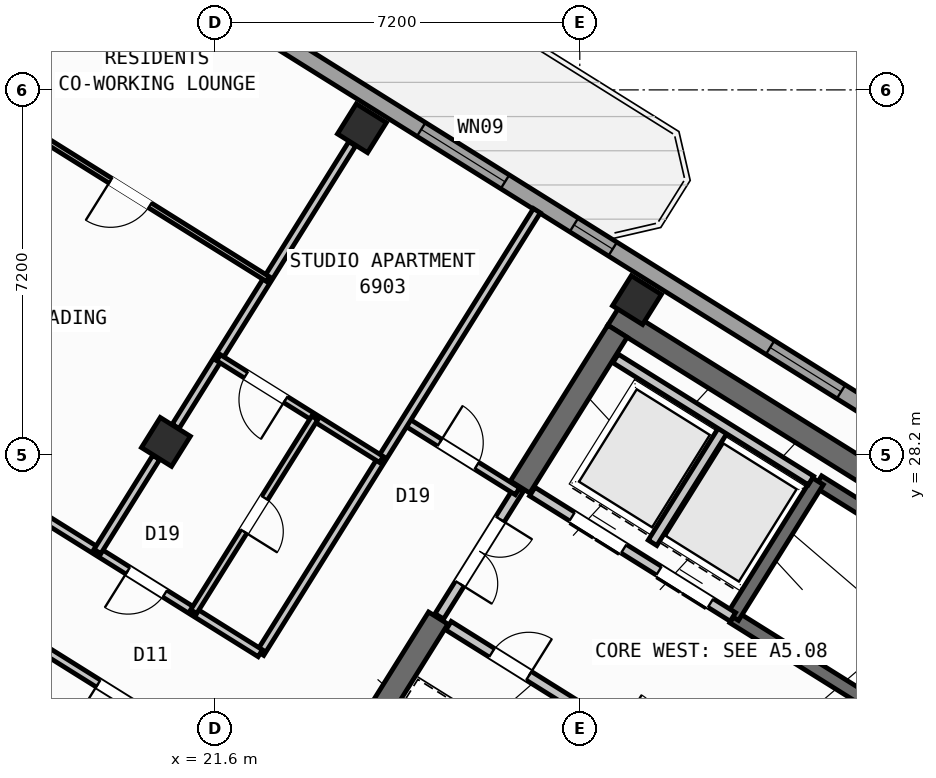
"""IFC4 building model, lengths in metres.
Left out: names, types, materials, properties, quantities, classifications, styles, units other than length and angle.
Written with IfcOpenShell. Run it as: python <this file> out.ifc"""

import sys

from ifc_helpers import new_model, si_unit, direction, frame, frame_2d, origin, origin_2d, place, context, subcontext, project, spatial, rectangle, hollow_rectangle, extrude, source, transform, mapped, element, fill, save


model = new_model("IFC4")
c1 = context("Model", 3, precision=1e-05, world=origin(), true_north=direction((0.0, 1.0)))
c2 = subcontext(c1, "Body", "Model", "MODEL_VIEW")
j1 = project(units=[si_unit("LENGTHUNIT", "METRE"), si_unit("PLANEANGLEUNIT", "RADIAN")], contexts=[c1])
p1 = place(None, origin())
s1 = spatial("IfcSite", under=j1, at=p1, CompositionType="ELEMENT")
p2 = place(p1, origin())
s2 = spatial("IfcBuilding", under=s1, at=p2, CompositionType="ELEMENT")
p3 = place(p2, frame((0.0, 0.0, 273.6)))
s3 = spatial("IfcBuildingStorey", under=s2, at=p3, CompositionType="ELEMENT", Elevation=273.6)
p4 = place(p3, frame((40.531, 24.036, 0.0), z_axis=(0.0, 0.0, 1.0), x_axis=(-0.848048787466, 0.529918157905, 0.0)))
e1 = element("IfcWall", 1, at=p4, inside=s3, PredefinedType="SHEAR", context=c2, shape_type="SweptSolid", body=[
    extrude(rectangle(XDim=13.04, YDim=0.45, at=frame_2d((6.52, 0.0))), origin(), (0.0, 0.0, 1.0), 3.35),
])
p5 = place(p3, frame((29.544, 30.636, 0.0), z_axis=(0.0, 0.0, 1.0), x_axis=(-0.529902075036, -0.848058836916, 0.0)))
e2 = element("IfcWall", 2, at=p5, inside=s3, PredefinedType="SHEAR", context=c2, shape_type="SweptSolid", body=[
    extrude(rectangle(XDim=3.625, YDim=0.45, at=frame_2d((1.812, 0.0))), origin(), (0.0, 0.0, 1.0), 3.35),
])
p6 = place(p3, frame((26.007, 24.976, 0.0), z_axis=(0.0, 0.0, 1.0), x_axis=(-0.529931155655, -0.848040665456, 0.0)))
e3 = element("IfcWall", 3, at=p6, inside=s3, PredefinedType="SHEAR", context=c2, shape_type="SweptSolid", body=[
    extrude(rectangle(XDim=6.475, YDim=0.45, at=frame_2d((3.238, 0.0))), origin(), (0.0, 0.0, 1.0), 3.35),
])
m1 = source(origin(), c2, "Body", "SweptSolid", [
    extrude(hollow_rectangle(XDim=0.7, YDim=0.7, WallThickness=0.028, at=origin_2d()), origin(), (0.0, 0.0, 1.0), 3.6),
])
for number, where, z_axis, x_axis in (
    (4, (29.928, 31.251, 0.0), (0.0, 0.0, 1.0), (-0.848, 0.53, 0.0)),
    (5, (24.5, 34.643, 0.0), (0.0, 0.0, 1.0), (-0.848, 0.53, 0.0)),
    (6, (20.632, 28.452, 0.0), (0.0, 0.0, 1.0), (-0.848, 0.53, 0.0)),
):
    element("IfcColumn", number, at=place(p3, frame(where, z_axis=z_axis, x_axis=x_axis)), inside=s3, PredefinedType="COLUMN", context=c2, shape_type="MappedRepresentation", body=[
        mapped(m1, transform((0.0, 0.0, 0.0), scale=1.0)),
    ])
p7 = place(p3, frame((14.138, 41.825, 0.0), z_axis=(0.0, 0.0, 1.0), x_axis=(0.848046498049, -0.529921821731, 0.0)))
e7 = element("IfcWall", 7, at=p7, inside=s3, PredefinedType="STANDARD", context=c2, shape_type="SweptSolid", body=[
    extrude(rectangle(XDim=31.588, YDim=0.32, at=frame_2d((15.794, 0.0))), origin(), (0.0, 0.0, 1.0), 3.35),
])
p8 = place(p7, frame((3.46, 0.0, 0.0)))
e8 = element("IfcOpeningElement", 8, at=p8, cuts=e7, PredefinedType="OPENING", context=c2, shape_type="SweptSolid", body=[
    extrude(rectangle(XDim=1.05, YDim=2.15, at=frame_2d((0.525, 1.075))), frame((0.0, 0.17, 0.0), z_axis=(0.0, -1.0, 0.0), x_axis=(1.0, 0.0, 0.0)), (0.0, 0.0, 1.0), 0.34),
])
p9 = place(p7, frame((0.831, 0.0, 1.0)))
e9 = element("IfcOpeningElement", 9, at=p9, cuts=e7, PredefinedType="OPENING", context=c2, shape_type="SweptSolid", body=[
    extrude(rectangle(XDim=0.9, YDim=1.25, at=frame_2d((0.45, 0.625))), frame((0.0, 0.17, 0.0), z_axis=(0.0, -1.0, 0.0), x_axis=(1.0, 0.0, 0.0)), (0.0, 0.0, 1.0), 0.34),
])
p10 = place(p7, frame((8.719, 0.0, 0.9)))
e10 = element("IfcOpeningElement", 10, at=p10, cuts=e7, PredefinedType="OPENING", context=c2, shape_type="SweptSolid", body=[
    extrude(rectangle(XDim=1.35, YDim=1.45, at=frame_2d((0.675, 0.725))), frame((0.0, 0.17, 0.0), z_axis=(0.0, -1.0, 0.0), x_axis=(1.0, 0.0, 0.0)), (0.0, 0.0, 1.0), 0.34),
])
p11 = place(p7, frame((13.599, 0.0, 0.95)))
e11 = element("IfcOpeningElement", 11, at=p11, cuts=e7, PredefinedType="OPENING", context=c2, shape_type="SweptSolid", body=[
    extrude(rectangle(XDim=1.95, YDim=1.35, at=frame_2d((0.975, 0.675))), frame((0.0, 0.17, 0.0), z_axis=(0.0, -1.0, 0.0), x_axis=(1.0, 0.0, 0.0)), (0.0, 0.0, 1.0), 0.34),
])
p12 = place(p7, frame((17.154, 0.0, 1.0)))
e12 = element("IfcOpeningElement", 12, at=p12, cuts=e7, PredefinedType="OPENING", context=c2, shape_type="SweptSolid", body=[
    extrude(rectangle(XDim=0.9, YDim=1.25, at=frame_2d((0.45, 0.625))), frame((0.0, 0.17, 0.0), z_axis=(0.0, -1.0, 0.0), x_axis=(1.0, 0.0, 0.0)), (0.0, 0.0, 1.0), 0.34),
])
p13 = place(p7, frame((21.719, 0.0, 0.9)))
e13 = element("IfcOpeningElement", 13, at=p13, cuts=e7, PredefinedType="OPENING", context=c2, shape_type="SweptSolid", body=[
    extrude(rectangle(XDim=1.65, YDim=1.45, at=frame_2d((0.825, 0.725))), frame((0.0, 0.17, 0.0), z_axis=(0.0, -1.0, 0.0), x_axis=(1.0, 0.0, 0.0)), (0.0, 0.0, 1.0), 0.34),
])
p14 = place(p7, frame((27.419, 0.0, 0.9)))
e14 = element("IfcOpeningElement", 14, at=p14, cuts=e7, PredefinedType="OPENING", context=c2, shape_type="SweptSolid", body=[
    extrude(rectangle(XDim=1.65, YDim=1.45, at=frame_2d((0.825, 0.725))), frame((0.0, 0.17, 0.0), z_axis=(0.0, -1.0, 0.0), x_axis=(1.0, 0.0, 0.0)), (0.0, 0.0, 1.0), 0.34),
])
p15 = place(p3, frame((39.721, 23.788, 0.0), z_axis=(0.0, 0.0, 1.0), x_axis=(-0.848054434086, 0.529909121291, 0.0)))
e15 = element("IfcWall", 15, at=p15, inside=s3, PredefinedType="SHEAR", context=c2, shape_type="SweptSolid", body=[
    extrude(rectangle(XDim=7.33, YDim=0.26, at=frame_2d((3.665, 0.0))), origin(), (0.0, 0.0, 1.0), 3.35),
])
p16 = place(p3, frame((38.046, 21.108, 0.0), z_axis=(0.0, 0.0, 1.0), x_axis=(-0.848054434086, 0.529909121291, 0.0)))
e16 = element("IfcWall", 16, at=p16, inside=s3, PredefinedType="SHEAR", context=c2, shape_type="SweptSolid", body=[
    extrude(rectangle(XDim=7.33, YDim=0.26, at=frame_2d((3.665, 0.0))), origin(), (0.0, 0.0, 1.0), 3.35),
])
p17 = place(p16, frame((0.22, 0.0, 0.0)))
e17 = element("IfcOpeningElement", 17, at=p17, cuts=e16, PredefinedType="OPENING", context=c2, shape_type="SweptSolid", body=[
    extrude(rectangle(XDim=1.1, YDim=2.1, at=frame_2d((0.55, 1.05))), frame((0.0, 0.14, 0.0), z_axis=(0.0, -1.0, 0.0), x_axis=(1.0, 0.0, 0.0)), (0.0, 0.0, 1.0), 0.28),
])
p18 = place(p3, frame((33.496, 27.677, 0.0), z_axis=(0.0, 0.0, 1.0), x_axis=(-0.529908658664, -0.84805472316, 0.0)))
e18 = element("IfcWall", 18, at=p18, inside=s3, PredefinedType="SHEAR", context=c2, shape_type="SweptSolid", body=[
    extrude(rectangle(XDim=3.16, YDim=0.26, at=frame_2d((1.58, 0.0))), origin(), (0.0, 0.0, 1.0), 3.35),
])
p19 = place(p3, frame((31.822, 24.998, 0.0), z_axis=(0.0, 0.0, 1.0), x_axis=(-0.848054125777, 0.529909614701, 0.0)))
e19 = element("IfcWall", 19, at=p19, inside=s3, PredefinedType="STANDARD", context=c2, shape_type="SweptSolid", body=[
    extrude(rectangle(XDim=4.668, YDim=0.2, at=frame_2d((2.334, 0.0))), origin(), (0.0, 0.0, 1.0), 3.34),
])
p20 = place(p19, frame((0.52, 0.0, 0.0)))
e20 = element("IfcOpeningElement", 20, at=p20, cuts=e19, PredefinedType="OPENING", context=c2, shape_type="SweptSolid", body=[
    extrude(rectangle(XDim=1.2, YDim=2.15, at=frame_2d((0.6, 1.075))), frame((0.0, 0.11, 0.0), z_axis=(0.0, -1.0, 0.0), x_axis=(1.0, 0.0, 0.0)), (0.0, 0.0, 1.0), 0.22),
])
p21 = place(p19, frame((2.54, 0.0, 0.0)))
e21 = element("IfcOpeningElement", 21, at=p21, cuts=e19, PredefinedType="OPENING", context=c2, shape_type="SweptSolid", body=[
    extrude(rectangle(XDim=1.2, YDim=2.15, at=frame_2d((0.6, 1.075))), frame((0.0, 0.11, 0.0), z_axis=(0.0, -1.0, 0.0), x_axis=(1.0, 0.0, 0.0)), (0.0, 0.0, 1.0), 0.22),
])
p22 = place(p3, frame((31.645, 28.716, 0.0), z_axis=(0.0, 0.0, 1.0), x_axis=(-0.52986693015, -0.848080795876, 0.0)))
e22 = element("IfcWall", 22, at=p22, inside=s3, PredefinedType="STANDARD", context=c2, shape_type="SweptSolid", body=[
    extrude(rectangle(XDim=2.66, YDim=0.2, at=frame_2d((1.33, 0.0))), origin(), (0.0, 0.0, 1.0), 3.34),
])
p23 = place(p3, frame((33.363, 27.69, 0.0), z_axis=(0.0, 0.0, 1.0), x_axis=(-0.84804957148, 0.529916903215, 0.0)))
e23 = element("IfcWall", 23, at=p23, inside=s3, PredefinedType="STANDARD", context=c2, shape_type="SweptSolid", body=[
    extrude(rectangle(XDim=4.548, YDim=0.2, at=frame_2d((2.274, 0.0))), origin(), (0.0, 0.0, 1.0), 3.34),
])
p24 = place(p3, frame((31.525, 21.504, 0.0), z_axis=(0.0, 0.0, 1.0), x_axis=(-0.848042066329, 0.529928913853, 0.0)))
e24 = element("IfcWall", 24, at=p24, inside=s3, PredefinedType="STANDARD", context=c2, shape_type="SweptSolid", body=[
    extrude(rectangle(XDim=6.268, YDim=0.2, at=frame_2d((3.134, 0.0))), origin(), (0.0, 0.0, 1.0), 3.34),
])
p25 = place(p24, frame((4.4, 0.0, 0.0)))
e25 = element("IfcOpeningElement", 25, at=p25, cuts=e24, PredefinedType="OPENING", context=c2, shape_type="SweptSolid", body=[
    extrude(rectangle(XDim=0.86, YDim=2.05, at=frame_2d((0.43, 1.025))), frame((0.0, 0.11, 0.0), z_axis=(0.0, -1.0, 0.0), x_axis=(1.0, 0.0, 0.0)), (0.0, 0.0, 1.0), 0.22),
])
p26 = place(p24, frame((1.45, 0.0, 0.0)))
e26 = element("IfcOpeningElement", 26, at=p26, cuts=e24, PredefinedType="OPENING", context=c2, shape_type="SweptSolid", body=[
    extrude(rectangle(XDim=0.86, YDim=2.05, at=frame_2d((0.43, 1.025))), frame((0.0, 0.11, 0.0), z_axis=(0.0, -1.0, 0.0), x_axis=(1.0, 0.0, 0.0)), (0.0, 0.0, 1.0), 0.22),
])
p27 = place(p3, frame((27.596, 27.52, 0.0), z_axis=(0.0, 0.0, 1.0), x_axis=(-0.529865479138, -0.848081702443, 0.0)))
e27 = element("IfcWall", 27, at=p27, inside=s3, PredefinedType="STANDARD", context=c2, shape_type="SweptSolid", body=[
    extrude(rectangle(XDim=2.96, YDim=0.2, at=frame_2d((1.48, 0.0))), origin(), (0.0, 0.0, 1.0), 3.34),
])
p28 = place(p27, frame((0.7, 0.0, 0.0)))
e28 = element("IfcOpeningElement", 28, at=p28, cuts=e27, PredefinedType="OPENING", context=c2, shape_type="SweptSolid", body=[
    extrude(rectangle(XDim=1.5, YDim=2.15, at=frame_2d((0.75, 1.075))), frame((0.0, 0.11, 0.0), z_axis=(0.0, -1.0, 0.0), x_axis=(1.0, 0.0, 0.0)), (0.0, 0.0, 1.0), 0.22),
])
p29 = place(p3, frame((27.57, 27.478, 0.0), z_axis=(0.0, 0.0, 1.0), x_axis=(-0.848050851465, 0.529914854792, 0.0)))
e29 = element("IfcWall", 29, at=p29, inside=s3, PredefinedType="PARTITIONING", context=c2, shape_type="SweptSolid", body=[
    extrude(rectangle(XDim=2.61, YDim=0.16, at=frame_2d((1.305, 0.0))), origin(), (0.0, 0.0, 1.0), 3.34),
])
p30 = place(p29, frame((0.95, 0.0, 0.0)))
e30 = element("IfcOpeningElement", 30, at=p30, cuts=e29, PredefinedType="OPENING", context=c2, shape_type="SweptSolid", body=[
    extrude(rectangle(XDim=0.86, YDim=2.05, at=frame_2d((0.43, 1.025))), frame((0.0, 0.09, 0.0), z_axis=(0.0, -1.0, 0.0), x_axis=(1.0, 0.0, 0.0)), (0.0, 0.0, 1.0), 0.18),
])
p31 = place(p3, frame((27.953, 33.016, 0.0), z_axis=(0.0, 0.0, 1.0), x_axis=(-0.529909450694, -0.848054228257, 0.0)))
e31 = element("IfcWall", 31, at=p31, inside=s3, PredefinedType="PARTITIONING", context=c2, shape_type="SweptSolid", body=[
    extrude(rectangle(XDim=10.3, YDim=0.16, at=frame_2d((5.15, 0.0))), origin(), (0.0, 0.0, 1.0), 3.34),
])
p32 = place(p3, frame((22.495, 24.281, 0.0), z_axis=(0.0, 0.0, 1.0), x_axis=(-0.848052408131, 0.529912363569, 0.0)))
e32 = element("IfcWall", 32, at=p32, inside=s3, PredefinedType="PARTITIONING", context=c2, shape_type="SweptSolid", body=[
    extrude(rectangle(XDim=16.73, YDim=0.16, at=frame_2d((8.365, 0.0))), origin(), (0.0, 0.0, 1.0), 3.34),
])
p33 = place(p32, frame((2.22, 0.0, 0.0)))
e33 = element("IfcOpeningElement", 33, at=p33, cuts=e32, PredefinedType="OPENING", context=c2, shape_type="SweptSolid", body=[
    extrude(rectangle(XDim=0.86, YDim=2.05, at=frame_2d((0.43, 1.025))), frame((0.0, 0.09, 0.0), z_axis=(0.0, -1.0, 0.0), x_axis=(1.0, 0.0, 0.0)), (0.0, 0.0, 1.0), 0.18),
])
p34 = place(p32, frame((6.49, 0.0, 0.0)))
e34 = element("IfcOpeningElement", 34, at=p34, cuts=e32, PredefinedType="OPENING", context=c2, shape_type="SweptSolid", body=[
    extrude(rectangle(XDim=1.0, YDim=2.1, at=frame_2d((0.5, 1.05))), frame((0.0, 0.09, 0.0), z_axis=(0.0, -1.0, 0.0), x_axis=(1.0, 0.0, 0.0)), (0.0, 0.0, 1.0), 0.18),
])
p35 = place(p32, frame((14.76, 0.0, 0.0)))
e35 = element("IfcOpeningElement", 35, at=p35, cuts=e32, PredefinedType="OPENING", context=c2, shape_type="SweptSolid", body=[
    extrude(rectangle(XDim=1.0, YDim=2.1, at=frame_2d((0.5, 1.05))), frame((0.0, 0.09, 0.0), z_axis=(0.0, -1.0, 0.0), x_axis=(1.0, 0.0, 0.0)), (0.0, 0.0, 1.0), 0.18),
])
p36 = place(p3, frame((21.329, 22.416, 0.0), z_axis=(0.0, 0.0, 1.0), x_axis=(-0.848052408131, 0.529912363569, 0.0)))
e36 = element("IfcWall", 36, at=p36, inside=s3, PredefinedType="PARTITIONING", context=c2, shape_type="SweptSolid", body=[
    extrude(rectangle(XDim=16.73, YDim=0.16, at=frame_2d((8.365, 0.0))), origin(), (0.0, 0.0, 1.0), 3.34),
])
p37 = place(p36, frame((1.395, 0.0, 0.0)))
e37 = element("IfcOpeningElement", 37, at=p37, cuts=e36, PredefinedType="OPENING", context=c2, shape_type="SweptSolid", body=[
    extrude(rectangle(XDim=1.0, YDim=2.1, at=frame_2d((0.5, 1.05))), frame((0.0, 0.09, 0.0), z_axis=(0.0, -1.0, 0.0), x_axis=(1.0, 0.0, 0.0)), (0.0, 0.0, 1.0), 0.18),
])
p38 = place(p36, frame((7.82, 0.0, 0.0)))
e38 = element("IfcOpeningElement", 38, at=p38, cuts=e36, PredefinedType="OPENING", context=c2, shape_type="SweptSolid", body=[
    extrude(rectangle(XDim=1.0, YDim=2.1, at=frame_2d((0.5, 1.05))), frame((0.0, 0.09, 0.0), z_axis=(0.0, -1.0, 0.0), x_axis=(1.0, 0.0, 0.0)), (0.0, 0.0, 1.0), 0.18),
])
p39 = place(p36, frame((11.14, 0.0, 0.0)))
e39 = element("IfcOpeningElement", 39, at=p39, cuts=e36, PredefinedType="OPENING", context=c2, shape_type="SweptSolid", body=[
    extrude(rectangle(XDim=1.0, YDim=2.1, at=frame_2d((0.5, 1.05))), frame((0.0, 0.09, 0.0), z_axis=(0.0, -1.0, 0.0), x_axis=(1.0, 0.0, 0.0)), (0.0, 0.0, 1.0), 0.18),
])
p40 = place(p3, frame((24.309, 34.336, 0.0), z_axis=(0.0, 0.0, 1.0), x_axis=(-0.529895484599, -0.848062954858, 0.0)))
e40 = element("IfcWall", 40, at=p40, inside=s3, PredefinedType="PARTITIONING", context=c2, shape_type="SweptSolid", body=[
    extrude(rectangle(XDim=6.576, YDim=0.16, at=frame_2d((3.288, 0.0))), origin(), (0.0, 0.0, 1.0), 2.875),
])
p41 = place(p3, frame((20.44, 28.145, 0.0), z_axis=(0.0, 0.0, 1.0), x_axis=(-0.5299186965, -0.848048450915, 0.0)))
e41 = element("IfcWall", 41, at=p41, inside=s3, PredefinedType="PARTITIONING", context=c2, shape_type="SweptSolid", body=[
    extrude(rectangle(XDim=2.188, YDim=0.16, at=frame_2d((1.094, 0.0))), origin(), (0.0, 0.0, 1.0), 2.875),
])
p42 = place(p3, frame((24.885, 28.106, 0.0), z_axis=(0.0, 0.0, 1.0), x_axis=(-0.848059820872, 0.529900500304, 0.0)))
e42 = element("IfcWall", 42, at=p42, inside=s3, PredefinedType="PLUMBINGWALL", context=c2, shape_type="SweptSolid", body=[
    extrude(rectangle(XDim=3.79, YDim=0.14, at=frame_2d((1.895, 0.0))), origin(), (0.0, 0.0, 1.0), 3.34),
])
p43 = place(p42, frame((2.23, 0.0, 0.0)))
e43 = element("IfcOpeningElement", 43, at=p43, cuts=e42, PredefinedType="OPENING", context=c2, shape_type="SweptSolid", body=[
    extrude(rectangle(XDim=0.92, YDim=2.08, at=frame_2d((0.46, 1.04))), frame((0.0, 0.08, 0.0), z_axis=(0.0, -1.0, 0.0), x_axis=(1.0, 0.0, 0.0)), (0.0, 0.0, 1.0), 0.16),
])
p44 = place(p3, frame((23.57, 28.927, 0.0), z_axis=(0.0, 0.0, 1.0), x_axis=(-0.529911350634, -0.84805304107, 0.0)))
e44 = element("IfcWall", 44, at=p44, inside=s3, PredefinedType="PLUMBINGWALL", context=c2, shape_type="SweptSolid", body=[
    extrude(rectangle(XDim=4.51, YDim=0.14, at=frame_2d((2.255, 0.0))), origin(), (0.0, 0.0, 1.0), 3.025),
])
p45 = place(p44, frame((1.865, 0.0, 0.0)))
e45 = element("IfcOpeningElement", 45, at=p45, cuts=e44, PredefinedType="OPENING", context=c2, shape_type="SweptSolid", body=[
    extrude(rectangle(XDim=0.78, YDim=2.05, at=frame_2d((0.39, 1.025))), frame((0.0, 0.08, 0.0), z_axis=(0.0, -1.0, 0.0), x_axis=(1.0, 0.0, 0.0)), (0.0, 0.0, 1.0), 0.16),
])
p46 = place(p3, frame((18.881, 37.727, 0.0), z_axis=(0.0, 0.0, 1.0), x_axis=(-0.529938869374, -0.84803584519, 0.0)))
e46 = element("IfcWall", 46, at=p46, inside=s3, PredefinedType="PARTITIONING", context=c2, shape_type="SweptSolid", body=[
    extrude(rectangle(XDim=6.576, YDim=0.16, at=frame_2d((3.288, 0.0))), origin(), (0.0, 0.0, 1.0), 2.875),
])
p47 = place(p3, frame((22.642, 31.668, 0.0), z_axis=(0.0, 0.0, 1.0), x_axis=(-0.84806687439, 0.529889211593, 0.0)))
e47 = element("IfcWall", 47, at=p47, inside=s3, PredefinedType="PARTITIONING", context=c2, shape_type="SweptSolid", body=[
    extrude(rectangle(XDim=6.4, YDim=0.11, at=frame_2d((3.2, 0.0))), origin(), (0.0, 0.0, 1.0), 3.34),
])
p48 = place(p47, frame((2.74, 0.0, 0.0)))
e48 = element("IfcOpeningElement", 48, at=p48, cuts=e47, PredefinedType="OPENING", context=c2, shape_type="SweptSolid", body=[
    extrude(rectangle(XDim=0.92, YDim=2.08, at=frame_2d((0.46, 1.04))), frame((0.0, 0.065, 0.0), z_axis=(0.0, -1.0, 0.0), x_axis=(1.0, 0.0, 0.0)), (0.0, 0.0, 1.0), 0.13),
])
m2 = source(origin(), c2, "Body", "SweptSolid", [
    extrude(rectangle(XDim=1.95, YDim=1.35, at=frame_2d((0.975, 0.675))), frame((0.0, 0.03, 0.0), z_axis=(0.0, -1.0, 0.0), x_axis=(1.0, 0.0, 0.0)), (0.0, 0.0, 1.0), 0.06),
])
p49 = place(p11, origin())
e49 = element("IfcWindow", 49, at=p49, inside=s3, PartitioningType="SINGLE_PANEL", PredefinedType="WINDOW", context=c2, shape_type="MappedRepresentation", body=[
    mapped(m2, transform((0.0, 0.0, 0.0), scale=1.0)),
])
fill(e11, e49)
m3 = source(origin(), c2, "Body", "SweptSolid", [
    extrude(rectangle(XDim=0.9, YDim=1.25, at=frame_2d((0.45, 0.625))), frame((0.0, 0.03, 0.0), z_axis=(0.0, -1.0, 0.0), x_axis=(1.0, 0.0, 0.0)), (0.0, 0.0, 1.0), 0.06),
])
p50 = place(p12, origin())
e50 = element("IfcWindow", 50, at=p50, inside=s3, PartitioningType="SINGLE_PANEL", PredefinedType="WINDOW", context=c2, shape_type="MappedRepresentation", body=[
    mapped(m3, transform((0.0, 0.0, 0.0), scale=1.0)),
])
fill(e12, e50)
m4 = source(origin(), c2, "Body", "SweptSolid", [
    extrude(rectangle(XDim=1.65, YDim=1.45, at=frame_2d((0.825, 0.725))), frame((0.0, 0.03, 0.0), z_axis=(0.0, -1.0, 0.0), x_axis=(1.0, 0.0, 0.0)), (0.0, 0.0, 1.0), 0.06),
])
p51 = place(p13, origin())
e51 = element("IfcWindow", 51, at=p51, inside=s3, PartitioningType="SINGLE_PANEL", PredefinedType="WINDOW", context=c2, shape_type="MappedRepresentation", body=[
    mapped(m4, transform((0.0, 0.0, 0.0), scale=1.0)),
])
fill(e13, e51)
m5 = source(origin(), c2, "Body", "SweptSolid", [
    extrude(rectangle(XDim=1.2, YDim=2.15, at=frame_2d((0.6, 1.075))), frame((0.0, 0.025, 0.0), z_axis=(0.0, -1.0, 0.0), x_axis=(1.0, 0.0, 0.0)), (0.0, 0.0, 1.0), 0.05),
])
p52 = place(p20, origin())
e52 = element("IfcDoor", 52, at=p52, inside=s3, OperationType="DOUBLE_DOOR_SLIDING", PredefinedType="DOOR", context=c2, shape_type="MappedRepresentation", body=[
    mapped(m5, transform((0.0, 0.0, 0.0), scale=1.0)),
])
fill(e20, e52)
p53 = place(p21, origin())
e53 = element("IfcDoor", 53, at=p53, inside=s3, OperationType="DOUBLE_DOOR_SLIDING", PredefinedType="DOOR", context=c2, shape_type="MappedRepresentation", body=[
    mapped(m5, transform((0.0, 0.0, 0.0), scale=1.0)),
])
fill(e21, e53)
m6 = source(origin(), c2, "Body", "SweptSolid", [
    extrude(rectangle(XDim=0.86, YDim=2.05, at=frame_2d((0.43, 1.025))), frame((0.0, 0.025, 0.0), z_axis=(0.0, -1.0, 0.0), x_axis=(1.0, 0.0, 0.0)), (0.0, 0.0, 1.0), 0.05),
])
p54 = place(p25, frame((0.86, 0.0, 0.0), z_axis=(0.0, 0.0, 1.0), x_axis=(-1.0, 0.0, 0.0)))
e54 = element("IfcDoor", 54, at=p54, inside=s3, OperationType="SINGLE_SWING_RIGHT", PredefinedType="DOOR", context=c2, shape_type="MappedRepresentation", body=[
    mapped(m6, transform((0.0, 0.0, 0.0), scale=1.0)),
])
fill(e25, e54)
p55 = place(p30, frame((0.86, 0.0, 0.0), z_axis=(0.0, 0.0, 1.0), x_axis=(-1.0, 0.0, 0.0)))
e55 = element("IfcDoor", 55, at=p55, inside=s3, OperationType="SINGLE_SWING_LEFT", PredefinedType="DOOR", context=c2, shape_type="MappedRepresentation", body=[
    mapped(m6, transform((0.0, 0.0, 0.0), scale=1.0)),
])
fill(e30, e55)
m7 = source(origin(), c2, "Body", "SweptSolid", [
    extrude(rectangle(XDim=1.5, YDim=2.15, at=frame_2d((0.75, 1.075))), frame((0.0, 0.025, 0.0), z_axis=(0.0, -1.0, 0.0), x_axis=(1.0, 0.0, 0.0)), (0.0, 0.0, 1.0), 0.05),
])
p56 = place(p28, origin())
e56 = element("IfcDoor", 56, at=p56, inside=s3, OperationType="DOUBLE_DOOR_SINGLE_SWING", PredefinedType="DOOR", context=c2, shape_type="MappedRepresentation", body=[
    mapped(m7, transform((0.0, 0.0, 0.0), scale=1.0)),
])
fill(e28, e56)
m8 = source(origin(), c2, "Body", "SweptSolid", [
    extrude(rectangle(XDim=1.0, YDim=2.1, at=frame_2d((0.5, 1.05))), frame((0.0, 0.025, 0.0), z_axis=(0.0, -1.0, 0.0), x_axis=(1.0, 0.0, 0.0)), (0.0, 0.0, 1.0), 0.05),
])
p57 = place(p37, origin())
e57 = element("IfcDoor", 57, at=p57, inside=s3, OperationType="SINGLE_SWING_RIGHT", PredefinedType="DOOR", context=c2, shape_type="MappedRepresentation", body=[
    mapped(m8, transform((0.0, 0.0, 0.0), scale=1.0)),
])
fill(e37, e57)
p58 = place(p33, origin())
e58 = element("IfcDoor", 58, at=p58, inside=s3, OperationType="SINGLE_SWING_RIGHT", PredefinedType="DOOR", context=c2, shape_type="MappedRepresentation", body=[
    mapped(m6, transform((0.0, 0.0, 0.0), scale=1.0)),
])
fill(e33, e58)
m9 = source(origin(), c2, "Body", "SweptSolid", [
    extrude(rectangle(XDim=0.92, YDim=2.08, at=frame_2d((0.46, 1.04))), frame((0.0, 0.025, 0.0), z_axis=(0.0, -1.0, 0.0), x_axis=(1.0, 0.0, 0.0)), (0.0, 0.0, 1.0), 0.05),
])
p59 = place(p43, origin())
e59 = element("IfcDoor", 59, at=p59, inside=s3, OperationType="SINGLE_SWING_LEFT", PredefinedType="DOOR", context=c2, shape_type="MappedRepresentation", body=[
    mapped(m9, transform((0.0, 0.0, 0.0), scale=1.0)),
])
fill(e43, e59)
m10 = source(origin(), c2, "Body", "SweptSolid", [
    extrude(rectangle(XDim=0.78, YDim=2.05, at=frame_2d((0.39, 1.025))), frame((0.0, 0.025, 0.0), z_axis=(0.0, -1.0, 0.0), x_axis=(1.0, 0.0, 0.0)), (0.0, 0.0, 1.0), 0.05),
])
p60 = place(p45, origin())
e60 = element("IfcDoor", 60, at=p60, inside=s3, OperationType="SINGLE_SWING_RIGHT", PredefinedType="DOOR", context=c2, shape_type="MappedRepresentation", body=[
    mapped(m10, transform((0.0, 0.0, 0.0), scale=1.0)),
])
fill(e45, e60)
p61 = place(p48, origin())
e61 = element("IfcDoor", 61, at=p61, inside=s3, OperationType="SINGLE_SWING_RIGHT", PredefinedType="DOOR", context=c2, shape_type="MappedRepresentation", body=[
    mapped(m9, transform((0.0, 0.0, 0.0), scale=1.0)),
])
fill(e48, e61)
save(model, sys.argv[1])
